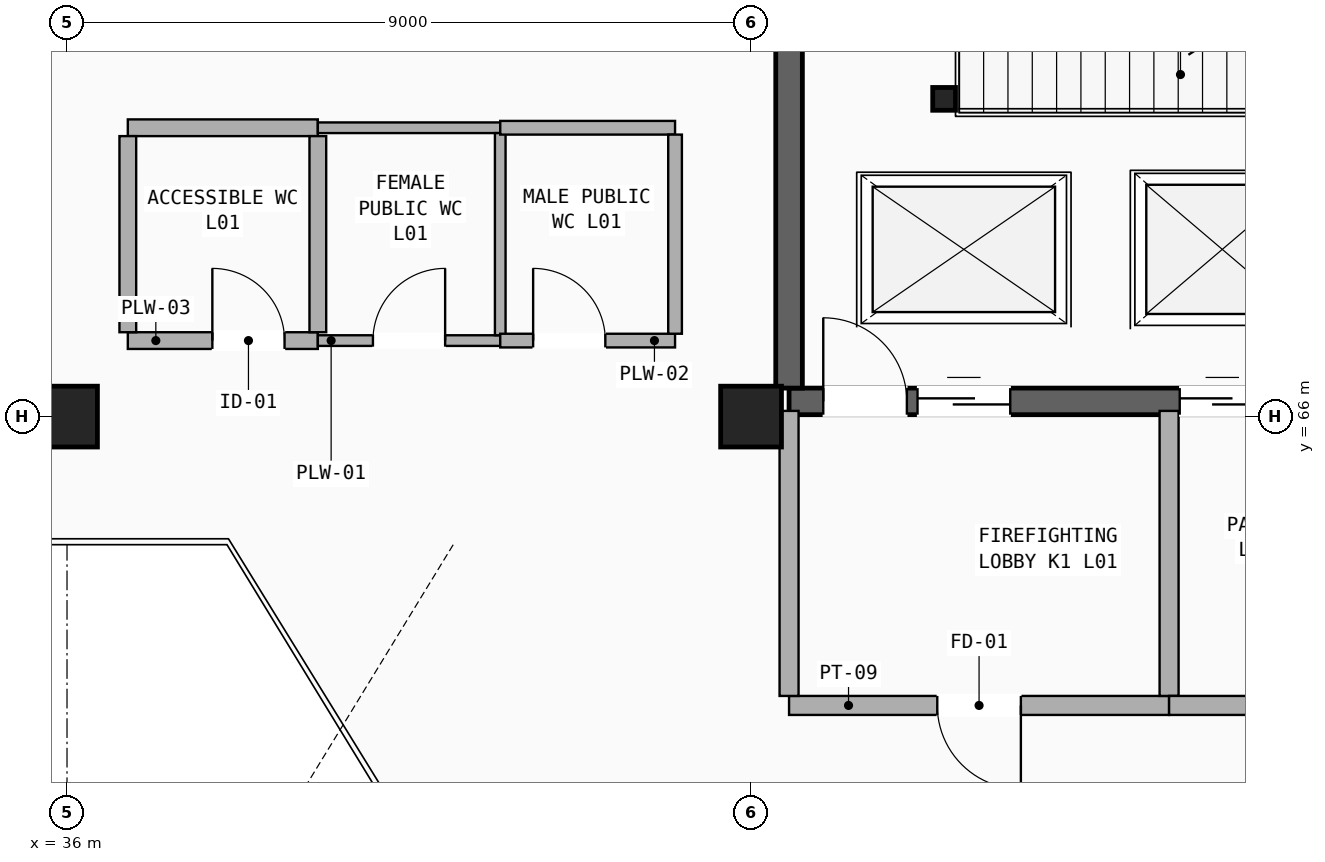
"""IFC4 building model, lengths in metres.
Left out: names, types, materials, properties, quantities, classifications, styles, units other than length and angle.
Written with IfcOpenShell. Run it as: python <this file> out.ifc"""

import sys

from ifc_helpers import new_model, si_unit, direction, frame, frame_2d, origin, origin_2d, place, context, subcontext, project, spatial, rectangle, hollow_rectangle, extrude, element, fill, save


model = new_model("IFC4")
c1 = context("Model", 3, precision=1e-05, world=origin(), true_north=direction((0.0, 1.0)))
c2 = subcontext(c1, "Body", "Model", "MODEL_VIEW")
j1 = project(units=[si_unit("LENGTHUNIT", "METRE"), si_unit("PLANEANGLEUNIT", "RADIAN")], contexts=[c1])
p1 = place(None, origin())
s1 = spatial("IfcSite", under=j1, at=p1, CompositionType="ELEMENT")
p2 = place(p1, origin())
s2 = spatial("IfcBuilding", under=s1, at=p2, CompositionType="ELEMENT")
p3 = place(p2, frame((0.0, 0.0, 5.1)))
s3 = spatial("IfcBuildingStorey", under=s2, at=p3, CompositionType="ELEMENT", Elevation=5.1)
for number, where, z_axis, x_axis in (
    (1, (36.0, 66.0, 0.0), (0.0, 0.0, 1.0), (1.0, 0.0, 0.0)),
    (2, (45.0, 66.0, 0.0), (0.0, 0.0, 1.0), (1.0, 0.0, 0.0)),
):
    element("IfcColumn", number, at=place(p3, frame(where, z_axis=z_axis, x_axis=x_axis)), inside=s3, PredefinedType="COLUMN", context=c2, shape_type="SweptSolid", body=[
        extrude(rectangle(XDim=0.8, YDim=0.8, at=origin_2d()), origin(), (0.0, 0.0, 1.0), 4.42),
    ])
p4 = place(p3, frame((45.5, 66.2, 0.0), z_axis=(0.0, 0.0, 1.0), x_axis=(1.0, 0.0, 0.0)))
e3 = element("IfcWall", 3, at=p4, inside=s3, PredefinedType="SHEAR", context=c2, shape_type="SweptSolid", body=[
    extrude(rectangle(XDim=10.3, YDim=0.35, at=frame_2d((5.15, 0.0))), origin(), (0.0, 0.0, 1.0), 4.42),
])
p5 = place(p4, frame((0.45, 0.0, 0.0)))
e4 = element("IfcOpeningElement", 4, at=p5, cuts=e3, PredefinedType="OPENING", context=c2, shape_type="SweptSolid", body=[
    extrude(rectangle(XDim=1.1, YDim=2.2, at=frame_2d((0.55, 1.1))), frame((0.0, 0.185, 0.0), z_axis=(0.0, -1.0, 0.0), x_axis=(1.0, 0.0, 0.0)), (0.0, 0.0, 1.0), 0.37),
])
p6 = place(p4, frame((1.69, 0.0, 0.0)))
e5 = element("IfcOpeningElement", 5, at=p6, cuts=e3, PredefinedType="OPENING", context=c2, shape_type="SweptSolid", body=[
    extrude(rectangle(XDim=1.22, YDim=2.2, at=frame_2d((0.61, 1.1))), frame((0.0, 0.185, 0.0), z_axis=(0.0, -1.0, 0.0), x_axis=(1.0, 0.0, 0.0)), (0.0, 0.0, 1.0), 0.37),
])
p7 = place(p4, frame((5.14, 0.0, 0.0)))
e6 = element("IfcOpeningElement", 6, at=p7, cuts=e3, PredefinedType="OPENING", context=c2, shape_type="SweptSolid", body=[
    extrude(rectangle(XDim=1.12, YDim=2.16, at=frame_2d((0.56, 1.08))), frame((0.0, 0.185, 0.0), z_axis=(0.0, -1.0, 0.0), x_axis=(1.0, 0.0, 0.0)), (0.0, 0.0, 1.0), 0.37),
])
p8 = place(p3, frame((45.5, 66.375, 0.0), z_axis=(0.0, 0.0, 1.0), x_axis=(0.0, 1.0, 0.0)))
e7 = element("IfcWall", 7, at=p8, inside=s3, PredefinedType="SHEAR", context=c2, shape_type="SweptSolid", body=[
    extrude(rectangle(XDim=8.25, YDim=0.35, at=frame_2d((4.125, 0.0))), origin(), (0.0, 0.0, 1.0), 4.42),
])
p9 = place(p3, frame((47.54, 70.18, 0.0), z_axis=(0.0, 0.0, 1.0), x_axis=(1.0, 0.0, 0.0)))
e8 = element("IfcColumn", 8, at=p9, inside=s3, PredefinedType="COLUMN", context=c2, shape_type="SweptSolid", body=[
    extrude(hollow_rectangle(XDim=0.3, YDim=0.3, WallThickness=0.016, InnerFilletRadius=0.016, OuterFilletRadius=0.032, at=origin_2d()), origin(), (0.0, 0.0, 1.0), 4.42),
])
p10 = place(p3, frame((45.5, 62.2, 0.0), z_axis=(0.0, 0.0, 1.0), x_axis=(1.0, 0.0, 0.0)))
e9 = element("IfcWall", 9, at=p10, inside=s3, PredefinedType="PARTITIONING", context=c2, shape_type="SweptSolid", body=[
    extrude(rectangle(XDim=5.0, YDim=0.25, at=frame_2d((2.5, 0.0))), origin(), (0.0, 0.0, 1.0), 4.16),
])
p11 = place(p10, frame((1.95, 0.0, 0.0)))
e10 = element("IfcOpeningElement", 10, at=p11, cuts=e9, PredefinedType="OPENING", context=c2, shape_type="SweptSolid", body=[
    extrude(rectangle(XDim=1.1, YDim=2.2, at=frame_2d((0.55, 1.1))), frame((0.0, 0.135, 0.0), z_axis=(0.0, -1.0, 0.0), x_axis=(1.0, 0.0, 0.0)), (0.0, 0.0, 1.0), 0.27),
])
for number, where, z_axis, x_axis in (
    (11, (45.5, 62.325, 0.0), (0.0, 0.0, 1.0), (0.0, 1.0, 0.0)),
    (12, (50.5, 62.325, 0.0), (0.0, 0.0, 1.0), (0.0, 1.0, 0.0)),
):
    element("IfcWall", number, at=place(p3, frame(where, z_axis=z_axis, x_axis=x_axis)), inside=s3, PredefinedType="PARTITIONING", context=c2, shape_type="SweptSolid", body=[
        extrude(rectangle(XDim=3.75, YDim=0.25, at=frame_2d((1.875, 0.0))), origin(), (0.0, 0.0, 1.0), 3.14),
    ])
p12 = place(p3, frame((50.5, 62.2, 0.0), z_axis=(0.0, 0.0, 1.0), x_axis=(1.0, 0.0, 0.0)))
e13 = element("IfcWall", 13, at=p12, inside=s3, PredefinedType="PARTITIONING", context=c2, shape_type="SweptSolid", body=[
    extrude(rectangle(XDim=5.3, YDim=0.25, at=frame_2d((2.65, 0.0))), origin(), (0.0, 0.0, 1.0), 3.46),
])
p13 = place(p12, frame((1.95, 0.0, 0.0)))
e14 = element("IfcOpeningElement", 14, at=p13, cuts=e13, PredefinedType="OPENING", context=c2, shape_type="SweptSolid", body=[
    extrude(rectangle(XDim=1.4, YDim=2.2, at=frame_2d((0.7, 1.1))), frame((0.0, 0.135, 0.0), z_axis=(0.0, -1.0, 0.0), x_axis=(1.0, 0.0, 0.0)), (0.0, 0.0, 1.0), 0.27),
])
p14 = place(p3, frame((36.8, 67.0, 0.0), z_axis=(0.0, 0.0, 1.0), x_axis=(1.0, 0.0, 0.0)))
e15 = element("IfcWall", 15, at=p14, inside=s3, PredefinedType="PLUMBINGWALL", context=c2, shape_type="SweptSolid", body=[
    extrude(rectangle(XDim=2.5, YDim=0.22, at=frame_2d((1.25, 0.0))), origin(), (0.0, 0.0, 1.0), 4.16),
])
p15 = place(p14, frame((1.112, 0.0, 0.0)))
e16 = element("IfcOpeningElement", 16, at=p15, cuts=e15, PredefinedType="OPENING", context=c2, shape_type="SweptSolid", body=[
    extrude(rectangle(XDim=0.95, YDim=2.15, at=frame_2d((0.475, 1.075))), frame((0.0, 0.12, 0.0), z_axis=(0.0, -1.0, 0.0), x_axis=(1.0, 0.0, 0.0)), (0.0, 0.0, 1.0), 0.24),
])
p16 = place(p3, frame((36.8, 69.8, 0.0), z_axis=(0.0, 0.0, 1.0), x_axis=(1.0, 0.0, 0.0)))
e17 = element("IfcWall", 17, at=p16, inside=s3, PredefinedType="PLUMBINGWALL", context=c2, shape_type="SweptSolid", body=[
    extrude(rectangle(XDim=2.5, YDim=0.22, at=frame_2d((1.25, 0.0))), origin(), (0.0, 0.0, 1.0), 4.16),
])
for number, where, z_axis, x_axis in (
    (18, (36.8, 67.11, 0.0), (0.0, 0.0, 1.0), (0.0, 1.0, 0.0)),
    (19, (39.3, 67.11, 0.0), (0.0, 0.0, 1.0), (0.0, 1.0, 0.0)),
):
    element("IfcWall", number, at=place(p3, frame(where, z_axis=z_axis, x_axis=x_axis)), inside=s3, PredefinedType="PLUMBINGWALL", context=c2, shape_type="SweptSolid", body=[
        extrude(rectangle(XDim=2.58, YDim=0.22, at=frame_2d((1.29, 0.0))), origin(), (0.0, 0.0, 1.0), 4.16),
    ])
p17 = place(p3, frame((39.3, 67.0, 0.0), z_axis=(0.0, 0.0, 1.0), x_axis=(1.0, 0.0, 0.0)))
e20 = element("IfcWall", 20, at=p17, inside=s3, PredefinedType="PLUMBINGWALL", context=c2, shape_type="SweptSolid", body=[
    extrude(rectangle(XDim=2.4, YDim=0.14, at=frame_2d((1.2, 0.0))), origin(), (0.0, 0.0, 1.0), 4.16),
])
p18 = place(p17, frame((0.725, 0.0, 0.0)))
e21 = element("IfcOpeningElement", 21, at=p18, cuts=e20, PredefinedType="OPENING", context=c2, shape_type="SweptSolid", body=[
    extrude(rectangle(XDim=0.95, YDim=2.15, at=frame_2d((0.475, 1.075))), frame((0.0, 0.08, 0.0), z_axis=(0.0, -1.0, 0.0), x_axis=(1.0, 0.0, 0.0)), (0.0, 0.0, 1.0), 0.16),
])
p19 = place(p3, frame((39.3, 69.8, 0.0), z_axis=(0.0, 0.0, 1.0), x_axis=(1.0, 0.0, 0.0)))
e22 = element("IfcWall", 22, at=p19, inside=s3, PredefinedType="PLUMBINGWALL", context=c2, shape_type="SweptSolid", body=[
    extrude(rectangle(XDim=2.4, YDim=0.14, at=frame_2d((1.2, 0.0))), origin(), (0.0, 0.0, 1.0), 4.16),
])
p20 = place(p3, frame((41.7, 67.07, 0.0), z_axis=(0.0, 0.0, 1.0), x_axis=(0.0, 1.0, 0.0)))
e23 = element("IfcWall", 23, at=p20, inside=s3, PredefinedType="PLUMBINGWALL", context=c2, shape_type="SweptSolid", body=[
    extrude(rectangle(XDim=2.66, YDim=0.14, at=frame_2d((1.33, 0.0))), origin(), (0.0, 0.0, 1.0), 4.16),
])
p21 = place(p3, frame((41.7, 67.0, 0.0), z_axis=(0.0, 0.0, 1.0), x_axis=(1.0, 0.0, 0.0)))
e24 = element("IfcWall", 24, at=p21, inside=s3, PredefinedType="PLUMBINGWALL", context=c2, shape_type="SweptSolid", body=[
    extrude(rectangle(XDim=2.3, YDim=0.18, at=frame_2d((1.15, 0.0))), origin(), (0.0, 0.0, 1.0), 4.16),
])
p22 = place(p21, frame((0.433, 0.0, 0.0)))
e25 = element("IfcOpeningElement", 25, at=p22, cuts=e24, PredefinedType="OPENING", context=c2, shape_type="SweptSolid", body=[
    extrude(rectangle(XDim=0.95, YDim=2.15, at=frame_2d((0.475, 1.075))), frame((0.0, 0.1, 0.0), z_axis=(0.0, -1.0, 0.0), x_axis=(1.0, 0.0, 0.0)), (0.0, 0.0, 1.0), 0.2),
])
p23 = place(p3, frame((41.7, 69.8, 0.0), z_axis=(0.0, 0.0, 1.0), x_axis=(1.0, 0.0, 0.0)))
e26 = element("IfcWall", 26, at=p23, inside=s3, PredefinedType="PLUMBINGWALL", context=c2, shape_type="SweptSolid", body=[
    extrude(rectangle(XDim=2.3, YDim=0.18, at=frame_2d((1.15, 0.0))), origin(), (0.0, 0.0, 1.0), 4.16),
])
p24 = place(p3, frame((44.0, 67.09, 0.0), z_axis=(0.0, 0.0, 1.0), x_axis=(0.0, 1.0, 0.0)))
e27 = element("IfcWall", 27, at=p24, inside=s3, PredefinedType="PLUMBINGWALL", context=c2, shape_type="SweptSolid", body=[
    extrude(rectangle(XDim=2.62, YDim=0.18, at=frame_2d((1.31, 0.0))), origin(), (0.0, 0.0, 1.0), 4.16),
])
p25 = place(p5, origin())
e28 = element("IfcDoor", 28, at=p25, inside=s3, OperationType="SINGLE_SWING_LEFT", PredefinedType="DOOR", context=c2, shape_type="SweptSolid", body=[
    extrude(rectangle(XDim=1.1, YDim=2.2, at=frame_2d((0.55, 1.1))), frame((0.0, 0.025, 0.0), z_axis=(0.0, -1.0, 0.0), x_axis=(1.0, 0.0, 0.0)), (0.0, 0.0, 1.0), 0.05),
])
fill(e4, e28)
p26 = place(p6, origin())
e29 = element("IfcDoor", 29, at=p26, inside=s3, OperationType="SLIDING_TO_LEFT", PredefinedType="DOOR", context=c2, shape_type="SweptSolid", body=[
    extrude(rectangle(XDim=1.22, YDim=2.2, at=frame_2d((0.61, 1.1))), frame((0.0, 0.025, 0.0), z_axis=(0.0, -1.0, 0.0), x_axis=(1.0, 0.0, 0.0)), (0.0, 0.0, 1.0), 0.05),
])
fill(e5, e29)
p27 = place(p7, origin())
e30 = element("IfcDoor", 30, at=p27, inside=s3, OperationType="SLIDING_TO_LEFT", PredefinedType="DOOR", context=c2, shape_type="SweptSolid", body=[
    extrude(rectangle(XDim=1.12, YDim=2.16, at=frame_2d((0.56, 1.08))), frame((0.0, 0.025, 0.0), z_axis=(0.0, -1.0, 0.0), x_axis=(1.0, 0.0, 0.0)), (0.0, 0.0, 1.0), 0.05),
])
fill(e6, e30)
p28 = place(p11, frame((1.1, 0.0, 0.0), z_axis=(0.0, 0.0, 1.0), x_axis=(-1.0, 0.0, 0.0)))
e31 = element("IfcDoor", 31, at=p28, inside=s3, OperationType="SINGLE_SWING_LEFT", PredefinedType="DOOR", context=c2, shape_type="SweptSolid", body=[
    extrude(rectangle(XDim=1.1, YDim=2.2, at=frame_2d((0.55, 1.1))), frame((0.0, 0.025, 0.0), z_axis=(0.0, -1.0, 0.0), x_axis=(1.0, 0.0, 0.0)), (0.0, 0.0, 1.0), 0.05),
])
fill(e10, e31)
p29 = place(p15, origin())
e32 = element("IfcDoor", 32, at=p29, inside=s3, OperationType="SINGLE_SWING_LEFT", PredefinedType="DOOR", context=c2, shape_type="SweptSolid", body=[
    extrude(rectangle(XDim=0.95, YDim=2.15, at=frame_2d((0.475, 1.075))), frame((0.0, 0.025, 0.0), z_axis=(0.0, -1.0, 0.0), x_axis=(1.0, 0.0, 0.0)), (0.0, 0.0, 1.0), 0.05),
])
fill(e16, e32)
p30 = place(p18, origin())
e33 = element("IfcDoor", 33, at=p30, inside=s3, OperationType="SINGLE_SWING_RIGHT", PredefinedType="DOOR", context=c2, shape_type="SweptSolid", body=[
    extrude(rectangle(XDim=0.95, YDim=2.15, at=frame_2d((0.475, 1.075))), frame((0.0, 0.025, 0.0), z_axis=(0.0, -1.0, 0.0), x_axis=(1.0, 0.0, 0.0)), (0.0, 0.0, 1.0), 0.05),
])
fill(e21, e33)
p31 = place(p22, origin())
e34 = element("IfcDoor", 34, at=p31, inside=s3, OperationType="SINGLE_SWING_LEFT", PredefinedType="DOOR", context=c2, shape_type="SweptSolid", body=[
    extrude(rectangle(XDim=0.95, YDim=2.15, at=frame_2d((0.475, 1.075))), frame((0.0, 0.025, 0.0), z_axis=(0.0, -1.0, 0.0), x_axis=(1.0, 0.0, 0.0)), (0.0, 0.0, 1.0), 0.05),
])
fill(e25, e34)
save(model, sys.argv[1])
